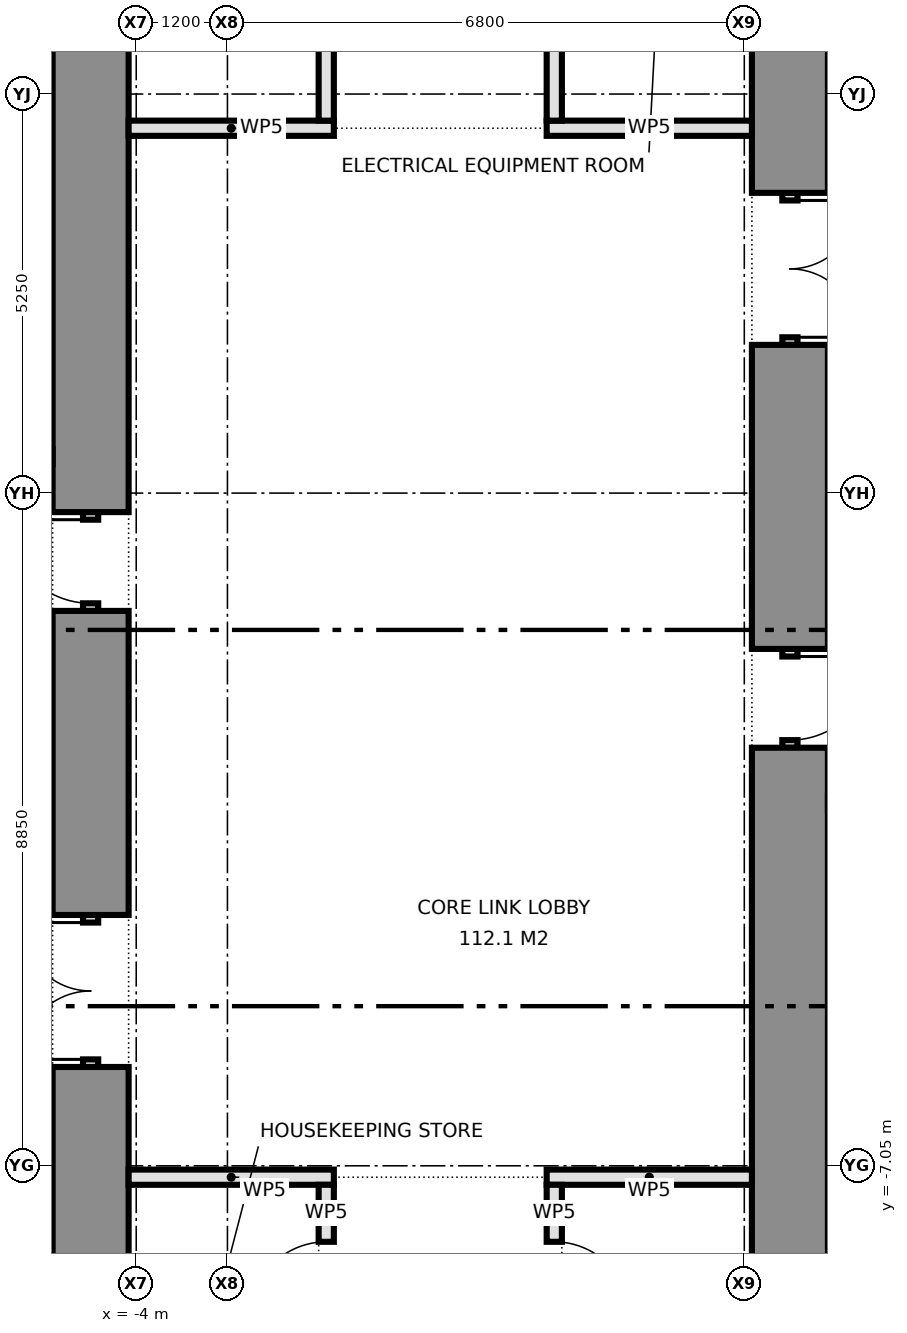
"""IFC4 building model, lengths in metres.
Left out: names, types, materials, properties, quantities, classifications, styles, units other than length and angle.
Written with IfcOpenShell. Run it as: python <this file> out.ifc"""

import sys

from ifc_helpers import new_model, si_unit, direction, frame, frame_2d, origin, place, context, subcontext, project, spatial, rectangle, extrude, element, fill, save


model = new_model("IFC4")
c1 = context("Model", 3, precision=1e-05, world=origin(), true_north=direction((0.0, 1.0)))
c2 = subcontext(c1, "Body", "Model", "MODEL_VIEW")
j1 = project(units=[si_unit("LENGTHUNIT", "METRE"), si_unit("PLANEANGLEUNIT", "RADIAN")], contexts=[c1])
p1 = place(None, origin())
s1 = spatial("IfcSite", under=j1, at=p1, CompositionType="ELEMENT")
p2 = place(p1, origin())
s2 = spatial("IfcBuilding", under=s1, at=p2, CompositionType="ELEMENT")
p3 = place(p2, frame((0.0, 0.0, 104.0)))
s3 = spatial("IfcBuildingStorey", under=s2, at=p3, CompositionType="ELEMENT", Elevation=104.0)
p4 = place(p3, frame((-4.6, -8.9, 0.0), z_axis=(0.0, 0.0, 1.0), x_axis=(0.0, 1.0, 0.0)))
e1 = element("IfcWall", 1, at=p4, inside=s3, PredefinedType="SHEAR", context=c2, shape_type="SweptSolid", body=[
    extrude(rectangle(XDim=3.15, YDim=1.0, at=frame_2d((1.575, 0.0))), origin(), (0.0, 0.0, 1.0), 4.2),
])
p5 = place(p3, frame((-4.6, -5.75, 0.0), z_axis=(0.0, 0.0, 1.0), x_axis=(0.0, 1.0, 0.0)))
e2 = element("IfcWall", 2, at=p5, inside=s3, PredefinedType="PARTITIONING", context=c2, shape_type="SweptSolid", body=[
    extrude(rectangle(XDim=2.0, YDim=0.2, at=frame_2d((1.0, 0.0))), origin(), (0.0, 0.0, 1.0), 2.4),
])
p6 = place(p5, frame((0.1, 0.0, 0.0)))
e3 = element("IfcOpeningElement", 3, at=p6, cuts=e2, PredefinedType="OPENING", context=c2, shape_type="SweptSolid", body=[
    extrude(rectangle(XDim=1.8, YDim=2.1, at=frame_2d((0.9, 1.05))), frame((0.0, 0.11, 0.0), z_axis=(0.0, -1.0, 0.0), x_axis=(1.0, 0.0, 0.0)), (0.0, 0.0, 1.0), 0.22),
])
p7 = place(p3, frame((-4.6, -3.75, 0.0), z_axis=(0.0, 0.0, 1.0), x_axis=(0.0, 1.0, 0.0)))
e4 = element("IfcWall", 4, at=p7, inside=s3, PredefinedType="SHEAR", context=c2, shape_type="SweptSolid", body=[
    extrude(rectangle(XDim=4.0, YDim=1.0, at=frame_2d((2.0, 0.0))), origin(), (0.0, 0.0, 1.0), 4.2),
])
p8 = place(p3, frame((-4.6, 0.25, 0.0), z_axis=(0.0, 0.0, 1.0), x_axis=(0.0, 1.0, 0.0)))
e5 = element("IfcWall", 5, at=p8, inside=s3, PredefinedType="PARTITIONING", context=c2, shape_type="SweptSolid", body=[
    extrude(rectangle(XDim=1.3, YDim=0.2, at=frame_2d((0.65, 0.0))), origin(), (0.0, 0.0, 1.0), 2.4),
])
p9 = place(p8, frame((0.1, 0.0, 0.0)))
e6 = element("IfcOpeningElement", 6, at=p9, cuts=e5, PredefinedType="OPENING", context=c2, shape_type="SweptSolid", body=[
    extrude(rectangle(XDim=1.1, YDim=2.1, at=frame_2d((0.55, 1.05))), frame((0.0, 0.11, 0.0), z_axis=(0.0, -1.0, 0.0), x_axis=(1.0, 0.0, 0.0)), (0.0, 0.0, 1.0), 0.22),
])
p10 = place(p3, frame((-4.6, 1.55, 0.0), z_axis=(0.0, 0.0, 1.0), x_axis=(0.0, 1.0, 0.0)))
e7 = element("IfcWall", 7, at=p10, inside=s3, PredefinedType="SHEAR", context=c2, shape_type="SweptSolid", body=[
    extrude(rectangle(XDim=7.35, YDim=1.0, at=frame_2d((3.675, 0.0))), origin(), (0.0, 0.0, 1.0), 4.2),
])
p11 = place(p3, frame((4.6, 8.9, 0.0), z_axis=(0.0, 0.0, 1.0), x_axis=(0.0, -1.0, 0.0)))
e8 = element("IfcWall", 8, at=p11, inside=s3, PredefinedType="SHEAR", context=c2, shape_type="SweptSolid", body=[
    extrude(rectangle(XDim=3.15, YDim=1.0, at=frame_2d((1.575, 0.0))), origin(), (0.0, 0.0, 1.0), 4.2),
])
p12 = place(p3, frame((4.6, 5.75, 0.0), z_axis=(0.0, 0.0, 1.0), x_axis=(0.0, -1.0, 0.0)))
e9 = element("IfcWall", 9, at=p12, inside=s3, PredefinedType="PARTITIONING", context=c2, shape_type="SweptSolid", body=[
    extrude(rectangle(XDim=2.0, YDim=0.2, at=frame_2d((1.0, 0.0))), origin(), (0.0, 0.0, 1.0), 2.4),
])
p13 = place(p12, frame((0.1, 0.0, 0.0)))
e10 = element("IfcOpeningElement", 10, at=p13, cuts=e9, PredefinedType="OPENING", context=c2, shape_type="SweptSolid", body=[
    extrude(rectangle(XDim=1.8, YDim=2.1, at=frame_2d((0.9, 1.05))), frame((0.0, 0.11, 0.0), z_axis=(0.0, -1.0, 0.0), x_axis=(1.0, 0.0, 0.0)), (0.0, 0.0, 1.0), 0.22),
])
p14 = place(p3, frame((4.6, 3.75, 0.0), z_axis=(0.0, 0.0, 1.0), x_axis=(0.0, -1.0, 0.0)))
e11 = element("IfcWall", 11, at=p14, inside=s3, PredefinedType="SHEAR", context=c2, shape_type="SweptSolid", body=[
    extrude(rectangle(XDim=4.0, YDim=1.0, at=frame_2d((2.0, 0.0))), origin(), (0.0, 0.0, 1.0), 4.2),
])
p15 = place(p3, frame((4.6, -0.25, 0.0), z_axis=(0.0, 0.0, 1.0), x_axis=(0.0, -1.0, 0.0)))
e12 = element("IfcWall", 12, at=p15, inside=s3, PredefinedType="PARTITIONING", context=c2, shape_type="SweptSolid", body=[
    extrude(rectangle(XDim=1.3, YDim=0.2, at=frame_2d((0.65, 0.0))), origin(), (0.0, 0.0, 1.0), 2.4),
])
p16 = place(p15, frame((0.1, 0.0, 0.0)))
e13 = element("IfcOpeningElement", 13, at=p16, cuts=e12, PredefinedType="OPENING", context=c2, shape_type="SweptSolid", body=[
    extrude(rectangle(XDim=1.1, YDim=2.1, at=frame_2d((0.55, 1.05))), frame((0.0, 0.11, 0.0), z_axis=(0.0, -1.0, 0.0), x_axis=(1.0, 0.0, 0.0)), (0.0, 0.0, 1.0), 0.22),
])
p17 = place(p3, frame((4.6, -1.55, 0.0), z_axis=(0.0, 0.0, 1.0), x_axis=(0.0, -1.0, 0.0)))
e14 = element("IfcWall", 14, at=p17, inside=s3, PredefinedType="SHEAR", context=c2, shape_type="SweptSolid", body=[
    extrude(rectangle(XDim=7.35, YDim=1.0, at=frame_2d((3.675, 0.0))), origin(), (0.0, 0.0, 1.0), 4.2),
])
for number, where, z_axis, x_axis in (
    (15, (-4.1, -7.2, 0.0), (0.0, 0.0, 1.0), (1.0, 0.0, 0.0)),
    (16, (1.4, -7.2, 0.0), (0.0, 0.0, 1.0), (1.0, 0.0, 0.0)),
    (17, (-4.1, 6.6, 0.0), (0.0, 0.0, 1.0), (1.0, 0.0, 0.0)),
    (18, (1.4, 6.6, 0.0), (0.0, 0.0, 1.0), (1.0, 0.0, 0.0)),
):
    element("IfcWall", number, at=place(p3, frame(where, z_axis=z_axis, x_axis=x_axis)), inside=s3, PredefinedType="PARTITIONING", context=c2, shape_type="SweptSolid", body=[
        extrude(rectangle(XDim=2.7, YDim=0.2, at=frame_2d((1.35, 0.0))), origin(), (0.0, 0.0, 1.0), 4.2),
    ])
p18 = place(p3, frame((1.5, -9.8, 0.0), z_axis=(0.0, 0.0, 1.0), x_axis=(0.0, 1.0, 0.0)))
e19 = element("IfcWall", 19, at=p18, inside=s3, PredefinedType="PARTITIONING", context=c2, shape_type="SweptSolid", body=[
    extrude(rectangle(XDim=2.5, YDim=0.2, at=frame_2d((1.25, 0.0))), origin(), (0.0, 0.0, 1.0), 4.2),
])
p19 = place(p18, frame((0.75, 0.0, 0.0)))
e20 = element("IfcOpeningElement", 20, at=p19, cuts=e19, PredefinedType="OPENING", context=c2, shape_type="SweptSolid", body=[
    extrude(rectangle(XDim=1.0, YDim=2.1, at=frame_2d((0.5, 1.05))), frame((0.0, 0.11, 0.0), z_axis=(0.0, -1.0, 0.0), x_axis=(1.0, 0.0, 0.0)), (0.0, 0.0, 1.0), 0.22),
])
p20 = place(p3, frame((1.5, 6.7, 0.0), z_axis=(0.0, 0.0, 1.0), x_axis=(0.0, 1.0, 0.0)))
e21 = element("IfcWall", 21, at=p20, inside=s3, PredefinedType="PARTITIONING", context=c2, shape_type="SweptSolid", body=[
    extrude(rectangle(XDim=3.1, YDim=0.2, at=frame_2d((1.55, 0.0))), origin(), (0.0, 0.0, 1.0), 4.2),
])
p21 = place(p20, frame((0.95, 0.0, 0.0)))
e22 = element("IfcOpeningElement", 22, at=p21, cuts=e21, PredefinedType="OPENING", context=c2, shape_type="SweptSolid", body=[
    extrude(rectangle(XDim=1.2, YDim=2.1, at=frame_2d((0.6, 1.05))), frame((0.0, 0.11, 0.0), z_axis=(0.0, -1.0, 0.0), x_axis=(1.0, 0.0, 0.0)), (0.0, 0.0, 1.0), 0.22),
])
p22 = place(p3, frame((-1.5, -9.8, 0.0), z_axis=(0.0, 0.0, 1.0), x_axis=(0.0, 1.0, 0.0)))
e23 = element("IfcWall", 23, at=p22, inside=s3, PredefinedType="PARTITIONING", context=c2, shape_type="SweptSolid", body=[
    extrude(rectangle(XDim=2.5, YDim=0.2, at=frame_2d((1.25, 0.0))), origin(), (0.0, 0.0, 1.0), 4.2),
])
p23 = place(p22, frame((0.75, 0.0, 0.0)))
e24 = element("IfcOpeningElement", 24, at=p23, cuts=e23, PredefinedType="OPENING", context=c2, shape_type="SweptSolid", body=[
    extrude(rectangle(XDim=1.0, YDim=2.1, at=frame_2d((0.5, 1.05))), frame((0.0, 0.11, 0.0), z_axis=(0.0, -1.0, 0.0), x_axis=(1.0, 0.0, 0.0)), (0.0, 0.0, 1.0), 0.22),
])
p24 = place(p3, frame((-1.5, 6.7, 0.0), z_axis=(0.0, 0.0, 1.0), x_axis=(0.0, 1.0, 0.0)))
e25 = element("IfcWall", 25, at=p24, inside=s3, PredefinedType="PARTITIONING", context=c2, shape_type="SweptSolid", body=[
    extrude(rectangle(XDim=3.1, YDim=0.2, at=frame_2d((1.55, 0.0))), origin(), (0.0, 0.0, 1.0), 4.2),
])
p25 = place(p24, frame((0.95, 0.0, 0.0)))
e26 = element("IfcOpeningElement", 26, at=p25, cuts=e25, PredefinedType="OPENING", context=c2, shape_type="SweptSolid", body=[
    extrude(rectangle(XDim=1.2, YDim=2.1, at=frame_2d((0.6, 1.05))), frame((0.0, 0.11, 0.0), z_axis=(0.0, -1.0, 0.0), x_axis=(1.0, 0.0, 0.0)), (0.0, 0.0, 1.0), 0.22),
])
p26 = place(p6, origin())
e27 = element("IfcDoor", 27, at=p26, inside=s3, OperationType="DOUBLE_DOOR_SINGLE_SWING", PredefinedType="DOOR", context=c2, shape_type="SweptSolid", body=[
    extrude(rectangle(XDim=1.8, YDim=2.1, at=frame_2d((0.9, 1.05))), frame((0.0, 0.025, 0.0), z_axis=(0.0, -1.0, 0.0), x_axis=(1.0, 0.0, 0.0)), (0.0, 0.0, 1.0), 0.05),
])
fill(e3, e27)
p27 = place(p9, origin())
e28 = element("IfcDoor", 28, at=p27, inside=s3, OperationType="SINGLE_SWING_RIGHT", PredefinedType="DOOR", context=c2, shape_type="SweptSolid", body=[
    extrude(rectangle(XDim=1.1, YDim=2.1, at=frame_2d((0.55, 1.05))), frame((0.0, 0.025, 0.0), z_axis=(0.0, -1.0, 0.0), x_axis=(1.0, 0.0, 0.0)), (0.0, 0.0, 1.0), 0.05),
])
fill(e6, e28)
p28 = place(p13, origin())
e29 = element("IfcDoor", 29, at=p28, inside=s3, OperationType="DOUBLE_DOOR_SINGLE_SWING", PredefinedType="DOOR", context=c2, shape_type="SweptSolid", body=[
    extrude(rectangle(XDim=1.8, YDim=2.1, at=frame_2d((0.9, 1.05))), frame((0.0, 0.025, 0.0), z_axis=(0.0, -1.0, 0.0), x_axis=(1.0, 0.0, 0.0)), (0.0, 0.0, 1.0), 0.05),
])
fill(e10, e29)
p29 = place(p16, origin())
e30 = element("IfcDoor", 30, at=p29, inside=s3, OperationType="SINGLE_SWING_LEFT", PredefinedType="DOOR", context=c2, shape_type="SweptSolid", body=[
    extrude(rectangle(XDim=1.1, YDim=2.1, at=frame_2d((0.55, 1.05))), frame((0.0, 0.025, 0.0), z_axis=(0.0, -1.0, 0.0), x_axis=(1.0, 0.0, 0.0)), (0.0, 0.0, 1.0), 0.05),
])
fill(e13, e30)
p30 = place(p23, origin())
e31 = element("IfcDoor", 31, at=p30, inside=s3, OperationType="SINGLE_SWING_LEFT", PredefinedType="DOOR", context=c2, shape_type="SweptSolid", body=[
    extrude(rectangle(XDim=1.0, YDim=2.1, at=frame_2d((0.5, 1.05))), frame((0.0, 0.025, 0.0), z_axis=(0.0, -1.0, 0.0), x_axis=(1.0, 0.0, 0.0)), (0.0, 0.0, 1.0), 0.05),
])
fill(e24, e31)
p31 = place(p19, frame((1.0, 0.0, 0.0), z_axis=(0.0, 0.0, 1.0), x_axis=(-1.0, 0.0, 0.0)))
e32 = element("IfcDoor", 32, at=p31, inside=s3, OperationType="SINGLE_SWING_RIGHT", PredefinedType="DOOR", context=c2, shape_type="SweptSolid", body=[
    extrude(rectangle(XDim=1.0, YDim=2.1, at=frame_2d((0.5, 1.05))), frame((0.0, 0.025, 0.0), z_axis=(0.0, -1.0, 0.0), x_axis=(1.0, 0.0, 0.0)), (0.0, 0.0, 1.0), 0.05),
])
fill(e20, e32)
save(model, sys.argv[1])
